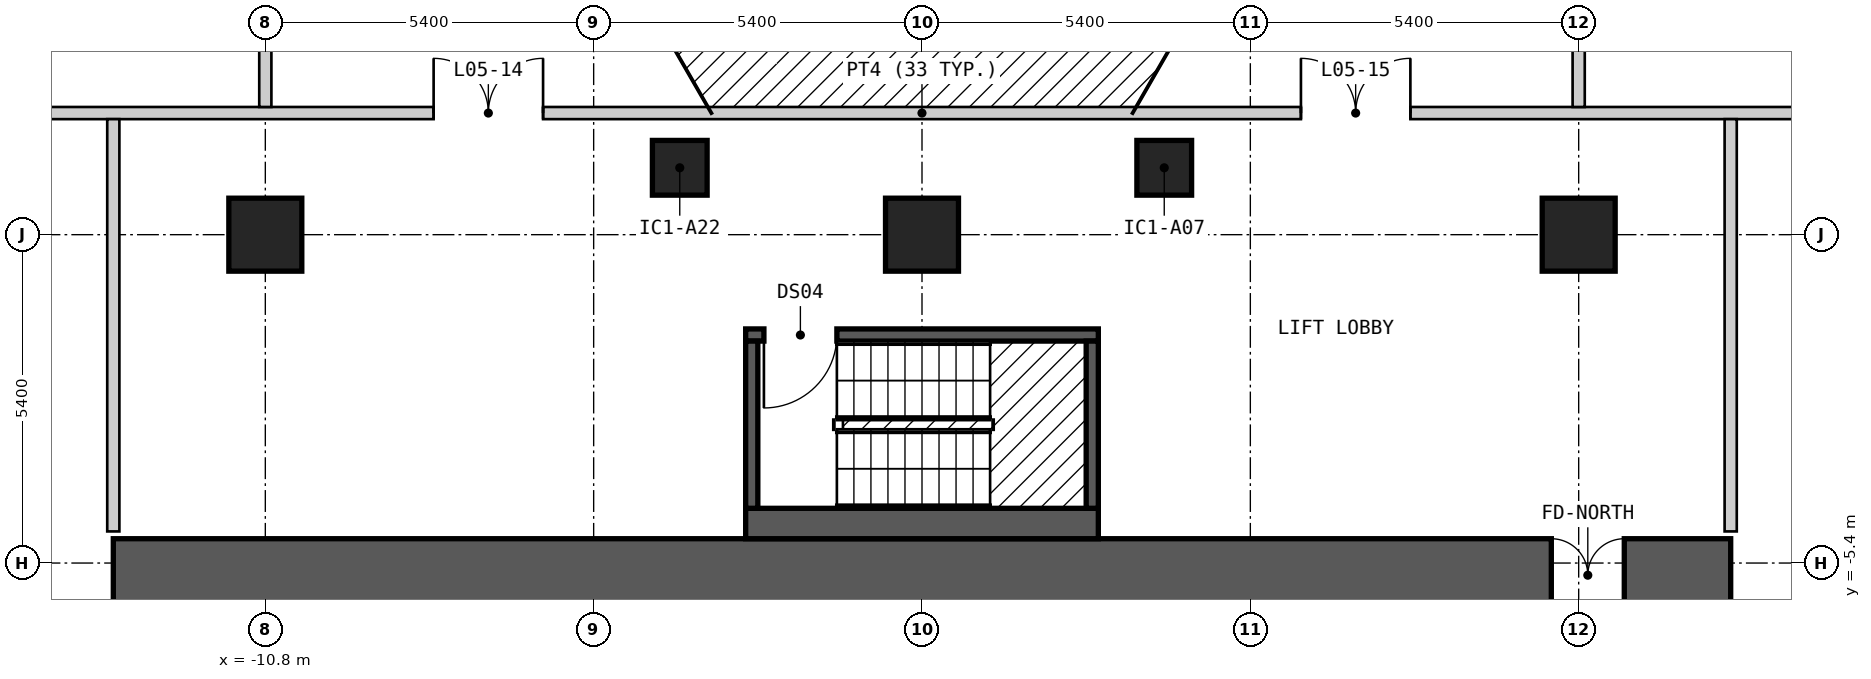
"""IFC4 building model, lengths in metres.
Left out: names, types, materials, properties, quantities, classifications, styles, units other than length and angle.
Written with IfcOpenShell. Run it as: python <this file> out.ifc"""

import sys

from ifc_helpers import new_model, si_unit, direction, frame, frame_2d, origin, origin_2d, place, context, subcontext, project, spatial, rectangle, extrude, element, fill, save


model = new_model("IFC4")
c1 = context("Model", 3, precision=1e-05, world=origin(), true_north=direction((0.0, 1.0)))
c2 = subcontext(c1, "Body", "Model", "MODEL_VIEW")
j1 = project(units=[si_unit("LENGTHUNIT", "METRE"), si_unit("PLANEANGLEUNIT", "RADIAN")], contexts=[c1])
p1 = place(None, origin())
s1 = spatial("IfcSite", under=j1, at=p1, CompositionType="ELEMENT")
p2 = place(p1, origin())
s2 = spatial("IfcBuilding", under=s1, at=p2, CompositionType="ELEMENT")
p3 = place(p2, frame((0.0, 0.0, 19.8)))
s3 = spatial("IfcBuildingStorey", under=s2, at=p3, CompositionType="ELEMENT", Elevation=19.8)
for number, where, z_axis, x_axis in (
    (1, (3.984, 1.1, 0.0), (0.0, 0.0, 1.0), (1.0, 0.0, 0.0)),
    (2, (-3.984, 1.1, 0.0), (0.0, 0.0, 1.0), (1.0, 0.0, 0.0)),
):
    element("IfcColumn", number, at=place(p3, frame(where, z_axis=z_axis, x_axis=x_axis)), inside=s3, PredefinedType="COLUMN", context=c2, shape_type="SweptSolid", body=[
        extrude(rectangle(XDim=0.9, YDim=0.9, at=origin_2d()), origin(), (0.0, 0.0, 1.0), 3.6),
    ])
for number, where, z_axis, x_axis in (
    (3, (-10.8, 0.0, 0.0), (0.0, 0.0, 1.0), (1.0, 0.0, 0.0)),
    (4, (0.0, 0.0, 0.0), (0.0, 0.0, 1.0), (1.0, 0.0, 0.0)),
    (5, (10.8, 0.0, 0.0), (0.0, 0.0, 1.0), (1.0, 0.0, 0.0)),
):
    element("IfcColumn", number, at=place(p3, frame(where, z_axis=z_axis, x_axis=x_axis)), inside=s3, PredefinedType="COLUMN", context=c2, shape_type="SweptSolid", body=[
        extrude(rectangle(XDim=1.2, YDim=1.2, at=origin_2d()), origin(), (0.0, 0.0, 1.0), 3.6),
    ])
p4 = place(p3, frame((-13.3, -5.6, 0.0), z_axis=(0.0, 0.0, 1.0), x_axis=(1.0, 0.0, 0.0)))
e6 = element("IfcWall", 6, at=p4, inside=s3, PredefinedType="SHEAR", context=c2, shape_type="SweptSolid", body=[
    extrude(rectangle(XDim=26.6, YDim=1.2, at=frame_2d((13.3, 0.0))), origin(), (0.0, 0.0, 1.0), 2.8),
])
p5 = place(p4, frame((23.65, 0.0, 0.0)))
e7 = element("IfcOpeningElement", 7, at=p5, cuts=e6, PredefinedType="OPENING", context=c2, shape_type="SweptSolid", body=[
    extrude(rectangle(XDim=1.2, YDim=2.1, at=frame_2d((0.6, 1.05))), frame((0.0, 0.61, 0.0), z_axis=(0.0, -1.0, 0.0), x_axis=(1.0, 0.0, 0.0)), (0.0, 0.0, 1.0), 1.22),
])
p6 = place(p3, frame((-2.9, -4.75, 0.0), z_axis=(0.0, 0.0, 1.0), x_axis=(1.0, 0.0, 0.0)))
e8 = element("IfcWall", 8, at=p6, inside=s3, PredefinedType="SOLIDWALL", context=c2, shape_type="SweptSolid", body=[
    extrude(rectangle(XDim=5.8, YDim=0.5, at=frame_2d((2.9, 0.0))), origin(), (0.0, 0.0, 1.0), 2.8),
])
p7 = place(p3, frame((-2.9, -1.65, 0.0), z_axis=(0.0, 0.0, 1.0), x_axis=(1.0, 0.0, 0.0)))
e9 = element("IfcWall", 9, at=p7, inside=s3, PredefinedType="SOLIDWALL", context=c2, shape_type="SweptSolid", body=[
    extrude(rectangle(XDim=5.8, YDim=0.2, at=frame_2d((2.9, 0.0))), origin(), (0.0, 0.0, 1.0), 2.8),
])
p8 = place(p7, frame((0.3, 0.0, 0.0)))
e10 = element("IfcOpeningElement", 10, at=p8, cuts=e9, PredefinedType="OPENING", context=c2, shape_type="SweptSolid", body=[
    extrude(rectangle(XDim=1.2, YDim=2.1, at=frame_2d((0.6, 1.05))), frame((0.0, 0.11, 0.0), z_axis=(0.0, -1.0, 0.0), x_axis=(1.0, 0.0, 0.0)), (0.0, 0.0, 1.0), 0.22),
])
for number, where, z_axis, x_axis in (
    (11, (-2.8, -4.5, 0.0), (0.0, 0.0, 1.0), (0.0, 1.0, 0.0)),
    (12, (2.8, -4.5, 0.0), (0.0, 0.0, 1.0), (0.0, 1.0, 0.0)),
):
    element("IfcWall", number, at=place(p3, frame(where, z_axis=z_axis, x_axis=x_axis)), inside=s3, PredefinedType="SOLIDWALL", context=c2, shape_type="SweptSolid", body=[
        extrude(rectangle(XDim=2.75, YDim=0.2, at=frame_2d((1.375, 0.0))), origin(), (0.0, 0.0, 1.0), 2.8),
    ])
p9 = place(p3, frame((-29.549, 2.0, 0.0), z_axis=(0.0, 0.0, 1.0), x_axis=(1.0, 0.0, 0.0)))
e13 = element("IfcWall", 13, at=p9, inside=s3, PredefinedType="PARTITIONING", context=c2, shape_type="SweptSolid", body=[
    extrude(rectangle(XDim=59.097, YDim=0.2, at=frame_2d((29.549, 0.0))), origin(), (0.0, 0.0, 1.0), 2.8),
])
p10 = place(p9, frame((21.517, 0.0, 0.0)))
e14 = element("IfcOpeningElement", 14, at=p10, cuts=e13, PredefinedType="OPENING", context=c2, shape_type="SweptSolid", body=[
    extrude(rectangle(XDim=1.8, YDim=2.1, at=frame_2d((0.9, 1.05))), frame((0.0, 0.11, 0.0), z_axis=(0.0, -1.0, 0.0), x_axis=(1.0, 0.0, 0.0)), (0.0, 0.0, 1.0), 0.22),
])
p11 = place(p9, frame((35.781, 0.0, 0.0)))
e15 = element("IfcOpeningElement", 15, at=p11, cuts=e13, PredefinedType="OPENING", context=c2, shape_type="SweptSolid", body=[
    extrude(rectangle(XDim=1.8, YDim=2.1, at=frame_2d((0.9, 1.05))), frame((0.0, 0.11, 0.0), z_axis=(0.0, -1.0, 0.0), x_axis=(1.0, 0.0, 0.0)), (0.0, 0.0, 1.0), 0.22),
])
p12 = place(p3, frame((-13.3, -4.88, 0.0), z_axis=(0.0, 0.0, 1.0), x_axis=(0.0, 1.0, 0.0)))
e16 = element("IfcWall", 16, at=p12, inside=s3, PredefinedType="PARTITIONING", context=c2, shape_type="SweptSolid", body=[
    extrude(rectangle(XDim=6.78, YDim=0.2, at=frame_2d((3.39, 0.0))), origin(), (0.0, 0.0, 1.0), 2.8),
])
p13 = place(p3, frame((-10.8, 2.1, 0.0), z_axis=(0.0, 0.0, 1.0), x_axis=(0.0, 1.0, 0.0)))
e17 = element("IfcWall", 17, at=p13, inside=s3, PredefinedType="PARTITIONING", context=c2, shape_type="SweptSolid", body=[
    extrude(rectangle(XDim=24.7, YDim=0.2, at=frame_2d((12.35, 0.0))), origin(), (0.0, 0.0, 1.0), 2.8),
])
p14 = place(p13, frame((3.002, 0.0, 0.0)))
e18 = element("IfcOpeningElement", 18, at=p14, cuts=e17, PredefinedType="OPENING", context=c2, shape_type="SweptSolid", body=[
    extrude(rectangle(XDim=1.8, YDim=2.1, at=frame_2d((0.9, 1.05))), frame((0.0, 0.11, 0.0), z_axis=(0.0, -1.0, 0.0), x_axis=(1.0, 0.0, 0.0)), (0.0, 0.0, 1.0), 0.22),
])
p15 = place(p13, frame((11.398, 0.0, 0.0)))
e19 = element("IfcOpeningElement", 19, at=p15, cuts=e17, PredefinedType="OPENING", context=c2, shape_type="SweptSolid", body=[
    extrude(rectangle(XDim=1.0, YDim=2.1, at=frame_2d((0.5, 1.05))), frame((0.0, 0.11, 0.0), z_axis=(0.0, -1.0, 0.0), x_axis=(1.0, 0.0, 0.0)), (0.0, 0.0, 1.0), 0.22),
])
p16 = place(p3, frame((10.8, 2.1, 0.0), z_axis=(0.0, 0.0, 1.0), x_axis=(0.0, 1.0, 0.0)))
e20 = element("IfcWall", 20, at=p16, inside=s3, PredefinedType="PARTITIONING", context=c2, shape_type="SweptSolid", body=[
    extrude(rectangle(XDim=24.7, YDim=0.2, at=frame_2d((12.35, 0.0))), origin(), (0.0, 0.0, 1.0), 2.8),
])
p17 = place(p16, frame((4.302, 0.0, 0.0), z_axis=(0.0, 0.0, 1.0), x_axis=(-1.0, 0.0, 0.0)))
e21 = element("IfcOpeningElement", 21, at=p17, cuts=e20, PredefinedType="OPENING", context=c2, shape_type="SweptSolid", body=[
    extrude(rectangle(XDim=1.8, YDim=2.1, at=frame_2d((0.9, 1.05))), frame((0.0, 0.11, 0.0), z_axis=(0.0, -1.0, 0.0), x_axis=(1.0, 0.0, 0.0)), (0.0, 0.0, 1.0), 0.22),
])
p18 = place(p16, frame((14.146, 0.0, 0.0)))
e22 = element("IfcOpeningElement", 22, at=p18, cuts=e20, PredefinedType="OPENING", context=c2, shape_type="SweptSolid", body=[
    extrude(rectangle(XDim=1.0, YDim=2.1, at=frame_2d((0.5, 1.05))), frame((0.0, 0.11, 0.0), z_axis=(0.0, -1.0, 0.0), x_axis=(1.0, 0.0, 0.0)), (0.0, 0.0, 1.0), 0.22),
])
p19 = place(p3, frame((13.3, -4.88, 0.0), z_axis=(0.0, 0.0, 1.0), x_axis=(0.0, 1.0, 0.0)))
e23 = element("IfcWall", 23, at=p19, inside=s3, PredefinedType="PARTITIONING", context=c2, shape_type="SweptSolid", body=[
    extrude(rectangle(XDim=6.78, YDim=0.2, at=frame_2d((3.39, 0.0))), origin(), (0.0, 0.0, 1.0), 2.8),
])
p20 = place(p8, origin())
e24 = element("IfcDoor", 24, at=p20, inside=s3, OperationType="SINGLE_SWING_LEFT", PredefinedType="DOOR", context=c2, shape_type="SweptSolid", body=[
    extrude(rectangle(XDim=1.2, YDim=2.1, at=frame_2d((0.6, 1.05))), frame((0.0, 0.025, 0.0), z_axis=(0.0, -1.0, 0.0), x_axis=(1.0, 0.0, 0.0)), (0.0, 0.0, 1.0), 0.05),
])
fill(e10, e24)
p21 = place(p10, origin())
e25 = element("IfcDoor", 25, at=p21, inside=s3, OperationType="DOUBLE_DOOR_SINGLE_SWING", PredefinedType="DOOR", context=c2, shape_type="SweptSolid", body=[
    extrude(rectangle(XDim=1.8, YDim=2.1, at=frame_2d((0.9, 1.05))), frame((0.0, 0.025, 0.0), z_axis=(0.0, -1.0, 0.0), x_axis=(1.0, 0.0, 0.0)), (0.0, 0.0, 1.0), 0.05),
])
fill(e14, e25)
p22 = place(p11, origin())
e26 = element("IfcDoor", 26, at=p22, inside=s3, OperationType="DOUBLE_DOOR_SINGLE_SWING", PredefinedType="DOOR", context=c2, shape_type="SweptSolid", body=[
    extrude(rectangle(XDim=1.8, YDim=2.1, at=frame_2d((0.9, 1.05))), frame((0.0, 0.025, 0.0), z_axis=(0.0, -1.0, 0.0), x_axis=(1.0, 0.0, 0.0)), (0.0, 0.0, 1.0), 0.05),
])
fill(e15, e26)
p23 = place(p5, origin())
e27 = element("IfcDoor", 27, at=p23, inside=s3, OperationType="DOUBLE_DOOR_SINGLE_SWING", PredefinedType="DOOR", context=c2, shape_type="SweptSolid", body=[
    extrude(rectangle(XDim=1.2, YDim=2.1, at=frame_2d((0.6, 1.05))), frame((0.0, 0.025, 0.0), z_axis=(0.0, -1.0, 0.0), x_axis=(1.0, 0.0, 0.0)), (0.0, 0.0, 1.0), 0.05),
])
fill(e7, e27)
save(model, sys.argv[1])
